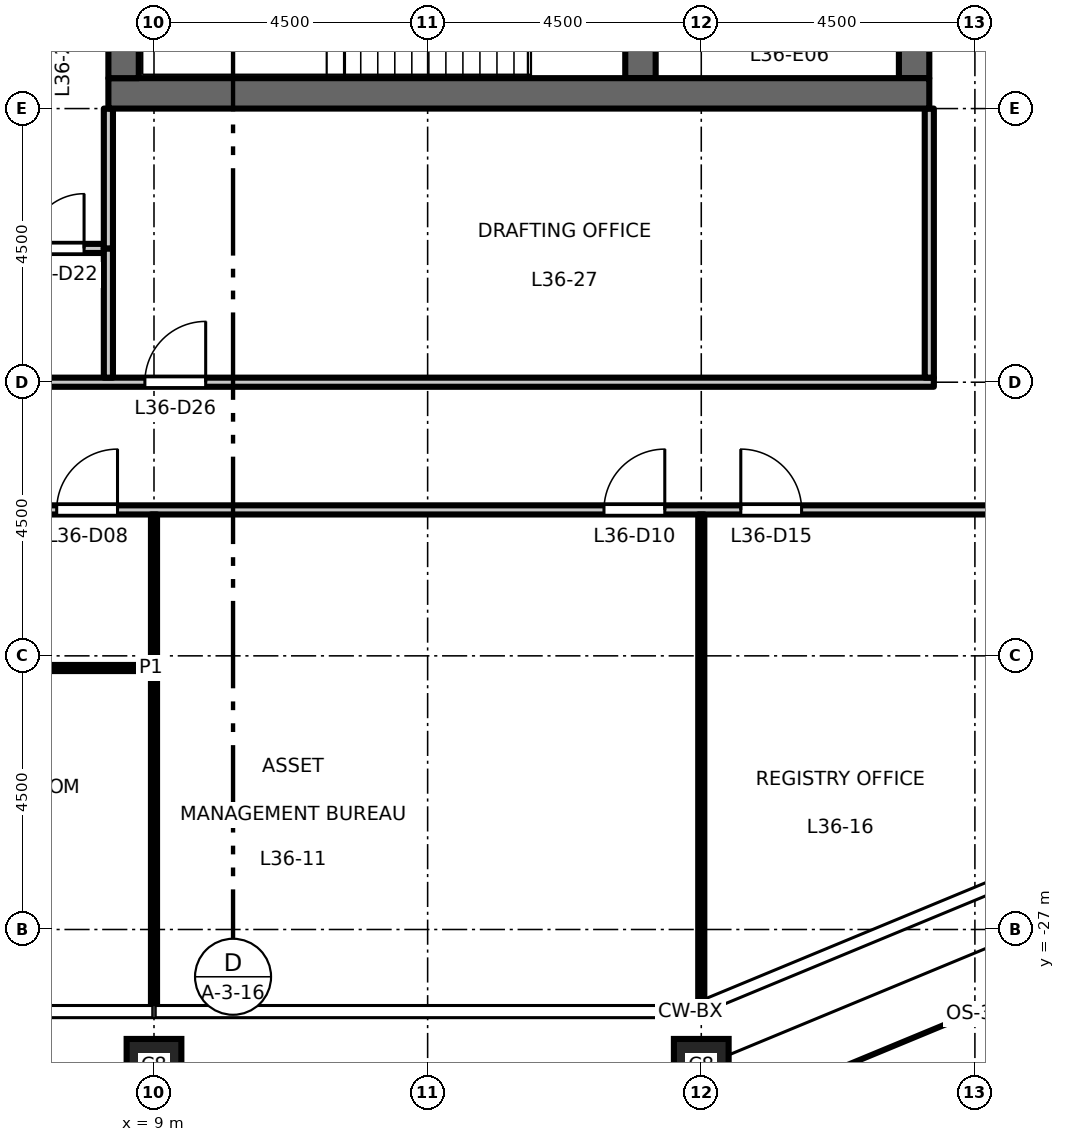
"""IFC4 building model, lengths in metres.
Left out: names, types, materials, properties, quantities, classifications, styles, units other than length and angle.
Written with IfcOpenShell. Run it as: python <this file> out.ifc"""

import sys

from ifc_helpers import new_model, si_unit, direction, frame, frame_2d, origin, origin_2d, place, context, subcontext, project, spatial, rectangle, hollow_rectangle, extrude, element, fill, save


model = new_model("IFC4")
c1 = context("Model", 3, precision=1e-05, world=origin(), true_north=direction((0.0, 1.0)))
c2 = subcontext(c1, "Body", "Model", "MODEL_VIEW")
j1 = project(units=[si_unit("LENGTHUNIT", "METRE"), si_unit("PLANEANGLEUNIT", "RADIAN")], contexts=[c1])
p1 = place(None, origin())
s1 = spatial("IfcSite", under=j1, at=p1, CompositionType="ELEMENT")
p2 = place(p1, origin())
s2 = spatial("IfcBuilding", under=s1, at=p2, CompositionType="ELEMENT")
p3 = place(p2, frame((0.0, 0.0, 167.7)))
s3 = spatial("IfcBuildingStorey", under=s2, at=p3, CompositionType="ELEMENT", Elevation=167.7)
for number, where, z_axis, x_axis in (
    (1, (9.0, -29.25, 0.0), (0.0, 0.0, 1.0), (1.0, 0.0, 0.0)),
    (2, (18.0, -29.25, 0.0), (0.0, 0.0, 1.0), (1.0, 0.0, 0.0)),
):
    element("IfcColumn", number, at=place(p3, frame(where, z_axis=z_axis, x_axis=x_axis)), inside=s3, PredefinedType="COLUMN", context=c2, shape_type="SweptSolid", body=[
        extrude(hollow_rectangle(XDim=0.9, YDim=0.9, WallThickness=0.05, at=origin_2d()), origin(), (0.0, 0.0, 1.0), 4.5),
    ])
p4 = place(p3, frame((21.5, -13.0, 0.0), z_axis=(0.0, 0.0, 1.0), x_axis=(0.0, 1.0, 0.0)))
e3 = element("IfcWall", 3, at=p4, inside=s3, PredefinedType="SHEAR", context=c2, shape_type="SweptSolid", body=[
    extrude(rectangle(XDim=26.0, YDim=0.5, at=frame_2d((13.0, 0.0))), origin(), (0.0, 0.0, 1.0), 4.35),
])
p5 = place(p4, frame((16.825, 0.0, 0.0)))
e4 = element("IfcOpeningElement", 4, at=p5, cuts=e3, PredefinedType="OPENING", context=c2, shape_type="SweptSolid", body=[
    extrude(rectangle(XDim=1.8, YDim=2.1, at=frame_2d((0.9, 1.05))), frame((0.0, 0.26, 0.0), z_axis=(0.0, -1.0, 0.0), x_axis=(1.0, 0.0, 0.0)), (0.0, 0.0, 1.0), 0.52),
])
p6 = place(p4, frame((7.375, 0.0, 0.0)))
e5 = element("IfcOpeningElement", 5, at=p6, cuts=e3, PredefinedType="OPENING", context=c2, shape_type="SweptSolid", body=[
    extrude(rectangle(XDim=1.8, YDim=2.1, at=frame_2d((0.9, 1.05))), frame((0.0, 0.26, 0.0), z_axis=(0.0, -1.0, 0.0), x_axis=(1.0, 0.0, 0.0)), (0.0, 0.0, 1.0), 0.52),
])
p7 = place(p4, frame((22.45, 0.0, 0.0)))
e6 = element("IfcOpeningElement", 6, at=p7, cuts=e3, PredefinedType="OPENING", context=c2, shape_type="SweptSolid", body=[
    extrude(rectangle(XDim=0.9, YDim=2.1, at=frame_2d((0.45, 1.05))), frame((0.0, 0.26, 0.0), z_axis=(0.0, -1.0, 0.0), x_axis=(1.0, 0.0, 0.0)), (0.0, 0.0, 1.0), 0.52),
])
p8 = place(p4, frame((1.7, 0.0, 0.0)))
e7 = element("IfcOpeningElement", 7, at=p8, cuts=e3, PredefinedType="OPENING", context=c2, shape_type="SweptSolid", body=[
    extrude(rectangle(XDim=0.9, YDim=2.1, at=frame_2d((0.45, 1.05))), frame((0.0, 0.26, 0.0), z_axis=(0.0, -1.0, 0.0), x_axis=(1.0, 0.0, 0.0)), (0.0, 0.0, 1.0), 0.52),
])
p9 = place(p3, frame((17.0, -13.0, 0.0), z_axis=(0.0, 0.0, 1.0), x_axis=(0.0, 1.0, 0.0)))
e8 = element("IfcWall", 8, at=p9, inside=s3, PredefinedType="SHEAR", context=c2, shape_type="SweptSolid", body=[
    extrude(rectangle(XDim=6.575, YDim=0.5, at=frame_2d((3.288, 0.0))), origin(), (0.0, 0.0, 1.0), 4.35),
])
p10 = place(p3, frame((8.25, -13.25, 0.0), z_axis=(0.0, 0.0, 1.0), x_axis=(1.0, 0.0, 0.0)))
e9 = element("IfcWall", 9, at=p10, inside=s3, PredefinedType="SHEAR", context=c2, shape_type="SweptSolid", body=[
    extrude(rectangle(XDim=13.5, YDim=0.5, at=frame_2d((6.75, 0.0))), origin(), (0.0, 0.0, 1.0), 4.35),
])
p11 = place(p3, frame((8.5, -13.0, 0.0), z_axis=(0.0, 0.0, 1.0), x_axis=(0.0, 1.0, 0.0)))
e10 = element("IfcWall", 10, at=p11, inside=s3, PredefinedType="SHEAR", context=c2, shape_type="SweptSolid", body=[
    extrude(rectangle(XDim=26.0, YDim=0.5, at=frame_2d((13.0, 0.0))), origin(), (0.0, 0.0, 1.0), 4.35),
])
p12 = place(p3, frame((0.05, -22.7, 0.0), z_axis=(0.0, 0.0, 1.0), x_axis=(1.0, 0.0, 0.0)))
e11 = element("IfcWall", 11, at=p12, inside=s3, PredefinedType="PARTITIONING", context=c2, shape_type="SweptSolid", body=[
    extrude(rectangle(XDim=8.9, YDim=0.1, at=frame_2d((4.45, 0.0))), origin(), (0.0, 0.0, 1.0), 4.35),
])
p13 = place(p12, frame((0.6, 0.0, 0.0)))
e12 = element("IfcOpeningElement", 12, at=p13, cuts=e11, PredefinedType="OPENING", context=c2, shape_type="SweptSolid", body=[
    extrude(rectangle(XDim=1.0, YDim=2.1, at=frame_2d((0.5, 1.05))), frame((0.0, 0.06, 0.0), z_axis=(0.0, -1.0, 0.0), x_axis=(1.0, 0.0, 0.0)), (0.0, 0.0, 1.0), 0.12),
])
p14 = place(p3, frame((-27.308, -20.1, 0.0), z_axis=(0.0, 0.0, 1.0), x_axis=(1.0, 0.0, 0.0)))
e13 = element("IfcWall", 13, at=p14, inside=s3, PredefinedType="PARTITIONING", context=c2, shape_type="SweptSolid", body=[
    extrude(rectangle(XDim=54.616, YDim=0.15, at=frame_2d((27.308, 0.0))), origin(), (0.0, 0.0, 1.0), 4.35),
])
p15 = place(p14, frame((16.708, 0.0, 0.0)))
e14 = element("IfcOpeningElement", 14, at=p15, cuts=e13, PredefinedType="OPENING", context=c2, shape_type="SweptSolid", body=[
    extrude(rectangle(XDim=1.0, YDim=2.1, at=frame_2d((0.5, 1.05))), frame((0.0, 0.085, 0.0), z_axis=(0.0, -1.0, 0.0), x_axis=(1.0, 0.0, 0.0)), (0.0, 0.0, 1.0), 0.17),
])
p16 = place(p14, frame((18.958, 0.0, 0.0)))
e15 = element("IfcOpeningElement", 15, at=p16, cuts=e13, PredefinedType="OPENING", context=c2, shape_type="SweptSolid", body=[
    extrude(rectangle(XDim=1.0, YDim=2.1, at=frame_2d((0.5, 1.05))), frame((0.0, 0.085, 0.0), z_axis=(0.0, -1.0, 0.0), x_axis=(1.0, 0.0, 0.0)), (0.0, 0.0, 1.0), 0.17),
])
p17 = place(p14, frame((34.708, 0.0, 0.0)))
e16 = element("IfcOpeningElement", 16, at=p17, cuts=e13, PredefinedType="OPENING", context=c2, shape_type="SweptSolid", body=[
    extrude(rectangle(XDim=1.0, YDim=2.1, at=frame_2d((0.5, 1.05))), frame((0.0, 0.085, 0.0), z_axis=(0.0, -1.0, 0.0), x_axis=(1.0, 0.0, 0.0)), (0.0, 0.0, 1.0), 0.17),
])
p18 = place(p14, frame((43.708, 0.0, 0.0)))
e17 = element("IfcOpeningElement", 17, at=p18, cuts=e13, PredefinedType="OPENING", context=c2, shape_type="SweptSolid", body=[
    extrude(rectangle(XDim=1.0, YDim=2.1, at=frame_2d((0.5, 1.05))), frame((0.0, 0.085, 0.0), z_axis=(0.0, -1.0, 0.0), x_axis=(1.0, 0.0, 0.0)), (0.0, 0.0, 1.0), 0.17),
])
p19 = place(p14, frame((7.65, 0.0, 0.0)))
e18 = element("IfcOpeningElement", 18, at=p19, cuts=e13, PredefinedType="OPENING", context=c2, shape_type="SweptSolid", body=[
    extrude(rectangle(XDim=1.0, YDim=2.1, at=frame_2d((0.5, 1.05))), frame((0.0, 0.085, 0.0), z_axis=(0.0, -1.0, 0.0), x_axis=(1.0, 0.0, 0.0)), (0.0, 0.0, 1.0), 0.17),
])
p20 = place(p14, frame((45.958, 0.0, 0.0)))
e19 = element("IfcOpeningElement", 19, at=p20, cuts=e13, PredefinedType="OPENING", context=c2, shape_type="SweptSolid", body=[
    extrude(rectangle(XDim=1.0, YDim=2.1, at=frame_2d((0.5, 1.05))), frame((0.0, 0.085, 0.0), z_axis=(0.0, -1.0, 0.0), x_axis=(1.0, 0.0, 0.0)), (0.0, 0.0, 1.0), 0.17),
])
p21 = place(p3, frame((-21.825, -18.0, 0.0), z_axis=(0.0, 0.0, 1.0), x_axis=(1.0, 0.0, 0.0)))
e20 = element("IfcWall", 20, at=p21, inside=s3, PredefinedType="PARTITIONING", context=c2, shape_type="SweptSolid", body=[
    extrude(rectangle(XDim=43.65, YDim=0.15, at=frame_2d((21.825, 0.0))), origin(), (0.0, 0.0, 1.0), 4.35),
])
p22 = place(p21, frame((14.175, 0.0, 0.0)))
e21 = element("IfcOpeningElement", 21, at=p22, cuts=e20, PredefinedType="OPENING", context=c2, shape_type="SweptSolid", body=[
    extrude(rectangle(XDim=1.0, YDim=2.1, at=frame_2d((0.5, 1.05))), frame((0.0, 0.085, 0.0), z_axis=(0.0, -1.0, 0.0), x_axis=(1.0, 0.0, 0.0)), (0.0, 0.0, 1.0), 0.17),
])
p23 = place(p21, frame((11.925, 0.0, 0.0)))
e22 = element("IfcOpeningElement", 22, at=p23, cuts=e20, PredefinedType="OPENING", context=c2, shape_type="SweptSolid", body=[
    extrude(rectangle(XDim=1.0, YDim=2.1, at=frame_2d((0.5, 1.05))), frame((0.0, 0.085, 0.0), z_axis=(0.0, -1.0, 0.0), x_axis=(1.0, 0.0, 0.0)), (0.0, 0.0, 1.0), 0.17),
])
p24 = place(p21, frame((30.675, 0.0, 0.0)))
e23 = element("IfcOpeningElement", 23, at=p24, cuts=e20, PredefinedType="OPENING", context=c2, shape_type="SweptSolid", body=[
    extrude(rectangle(XDim=1.0, YDim=2.1, at=frame_2d((0.5, 1.05))), frame((0.0, 0.085, 0.0), z_axis=(0.0, -1.0, 0.0), x_axis=(1.0, 0.0, 0.0)), (0.0, 0.0, 1.0), 0.17),
])
p25 = place(p3, frame((6.8, -15.8, 0.0), z_axis=(0.0, 0.0, 1.0), x_axis=(1.0, 0.0, 0.0)))
e24 = element("IfcWall", 24, at=p25, inside=s3, PredefinedType="PARTITIONING", context=c2, shape_type="SweptSolid", body=[
    extrude(rectangle(XDim=1.375, YDim=0.15, at=frame_2d((0.688, 0.0))), origin(), (0.0, 0.0, 1.0), 4.35),
])
p26 = place(p25, frame((0.15, 0.0, 0.0)))
e25 = element("IfcOpeningElement", 25, at=p26, cuts=e24, PredefinedType="OPENING", context=c2, shape_type="SweptSolid", body=[
    extrude(rectangle(XDim=0.9, YDim=2.1, at=frame_2d((0.45, 1.05))), frame((0.0, 0.085, 0.0), z_axis=(0.0, -1.0, 0.0), x_axis=(1.0, 0.0, 0.0)), (0.0, 0.0, 1.0), 0.17),
])
p27 = place(p3, frame((8.25, -17.925, 0.0), z_axis=(0.0, 0.0, 1.0), x_axis=(0.0, 1.0, 0.0)))
e26 = element("IfcWall", 26, at=p27, inside=s3, PredefinedType="PARTITIONING", context=c2, shape_type="SweptSolid", body=[
    extrude(rectangle(XDim=2.125, YDim=0.15, at=frame_2d((1.062, 0.0))), origin(), (0.0, 0.0, 1.0), 4.35),
])
p28 = place(p3, frame((8.25, -15.8, 0.0), z_axis=(0.0, 0.0, 1.0), x_axis=(0.0, 1.0, 0.0)))
e27 = element("IfcWall", 27, at=p28, inside=s3, PredefinedType="PARTITIONING", context=c2, shape_type="SweptSolid", body=[
    extrude(rectangle(XDim=2.3, YDim=0.15, at=frame_2d((1.15, 0.0))), origin(), (0.0, 0.0, 1.0), 4.35),
])
p29 = place(p3, frame((9.0, -28.26, 0.0), z_axis=(0.0, 0.0, 1.0), x_axis=(0.0, 1.0, 0.0)))
e28 = element("IfcWall", 28, at=p29, inside=s3, PredefinedType="PARTITIONING", context=c2, shape_type="SweptSolid", body=[
    extrude(rectangle(XDim=8.085, YDim=0.1, at=frame_2d((4.042, 0.0))), origin(), (0.0, 0.0, 1.0), 3.45),
])
p30 = place(p3, frame((18.0, -28.178, 0.0), z_axis=(0.0, 0.0, 1.0), x_axis=(0.0, 1.0, 0.0)))
e29 = element("IfcWall", 29, at=p30, inside=s3, PredefinedType="PARTITIONING", context=c2, shape_type="SweptSolid", body=[
    extrude(rectangle(XDim=8.003, YDim=0.1, at=frame_2d((4.001, 0.0))), origin(), (0.0, 0.0, 1.0), 3.45),
])
p31 = place(p3, frame((21.75, -17.925, 0.0), z_axis=(0.0, 0.0, 1.0), x_axis=(0.0, 1.0, 0.0)))
e30 = element("IfcWall", 30, at=p31, inside=s3, PredefinedType="PARTITIONING", context=c2, shape_type="SweptSolid", body=[
    extrude(rectangle(XDim=4.425, YDim=0.15, at=frame_2d((2.212, 0.0))), origin(), (0.0, 0.0, 1.0), 4.35),
])
p32 = place(p17, origin())
e31 = element("IfcDoor", 31, at=p32, inside=s3, OperationType="SINGLE_SWING_RIGHT", PredefinedType="DOOR", context=c2, shape_type="SweptSolid", body=[
    extrude(rectangle(XDim=1.0, YDim=2.1, at=frame_2d((0.5, 1.05))), frame((0.0, 0.025, 0.0), z_axis=(0.0, -1.0, 0.0), x_axis=(1.0, 0.0, 0.0)), (0.0, 0.0, 1.0), 0.05),
])
fill(e16, e31)
p33 = place(p18, origin())
e32 = element("IfcDoor", 32, at=p33, inside=s3, OperationType="SINGLE_SWING_RIGHT", PredefinedType="DOOR", context=c2, shape_type="SweptSolid", body=[
    extrude(rectangle(XDim=1.0, YDim=2.1, at=frame_2d((0.5, 1.05))), frame((0.0, 0.025, 0.0), z_axis=(0.0, -1.0, 0.0), x_axis=(1.0, 0.0, 0.0)), (0.0, 0.0, 1.0), 0.05),
])
fill(e17, e32)
p34 = place(p20, origin())
e33 = element("IfcDoor", 33, at=p34, inside=s3, OperationType="SINGLE_SWING_LEFT", PredefinedType="DOOR", context=c2, shape_type="SweptSolid", body=[
    extrude(rectangle(XDim=1.0, YDim=2.1, at=frame_2d((0.5, 1.05))), frame((0.0, 0.025, 0.0), z_axis=(0.0, -1.0, 0.0), x_axis=(1.0, 0.0, 0.0)), (0.0, 0.0, 1.0), 0.05),
])
fill(e19, e33)
p35 = place(p26, origin())
e34 = element("IfcDoor", 34, at=p35, inside=s3, OperationType="SINGLE_SWING_RIGHT", PredefinedType="DOOR", context=c2, shape_type="SweptSolid", body=[
    extrude(rectangle(XDim=0.9, YDim=2.1, at=frame_2d((0.45, 1.05))), frame((0.0, 0.025, 0.0), z_axis=(0.0, -1.0, 0.0), x_axis=(1.0, 0.0, 0.0)), (0.0, 0.0, 1.0), 0.05),
])
fill(e25, e34)
p36 = place(p24, origin())
e35 = element("IfcDoor", 35, at=p36, inside=s3, OperationType="SINGLE_SWING_RIGHT", PredefinedType="DOOR", context=c2, shape_type="SweptSolid", body=[
    extrude(rectangle(XDim=1.0, YDim=2.1, at=frame_2d((0.5, 1.05))), frame((0.0, 0.025, 0.0), z_axis=(0.0, -1.0, 0.0), x_axis=(1.0, 0.0, 0.0)), (0.0, 0.0, 1.0), 0.05),
])
fill(e23, e35)
save(model, sys.argv[1])
